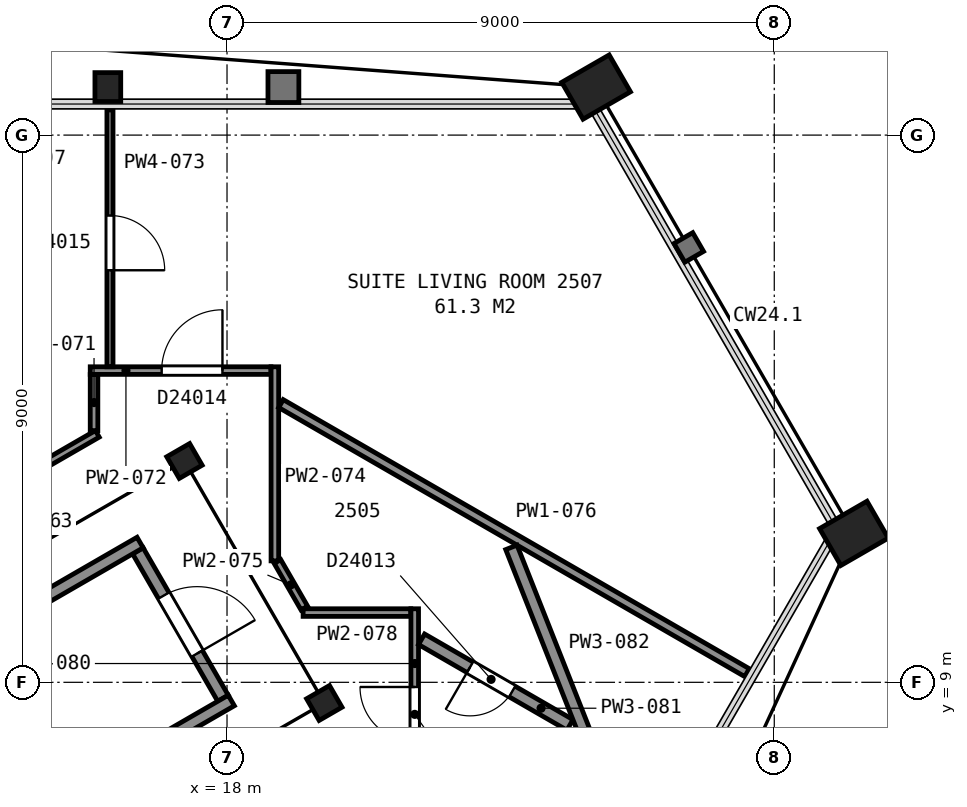
"""IFC4 building model, lengths in metres.
Left out: names, types, materials, properties, quantities, classifications, styles, units other than length and angle.
Written with IfcOpenShell. Run it as: python <this file> out.ifc"""

import sys

from ifc_helpers import new_model, si_unit, direction, frame, frame_2d, origin, origin_2d, place, context, subcontext, project, spatial, rectangle, hollow_rectangle, i_section, extrude, element, fill, save


model = new_model("IFC4")
c1 = context("Model", 3, precision=1e-05, world=origin(), true_north=direction((0.0, 1.0)))
c2 = subcontext(c1, "Body", "Model", "MODEL_VIEW")
j1 = project(units=[si_unit("LENGTHUNIT", "METRE"), si_unit("PLANEANGLEUNIT", "RADIAN")], contexts=[c1])
p1 = place(None, origin())
s1 = spatial("IfcSite", under=j1, at=p1, CompositionType="ELEMENT")
p2 = place(p1, origin())
s2 = spatial("IfcBuilding", under=s1, at=p2, CompositionType="ELEMENT")
p3 = place(p2, frame((0.0, 0.0, 107.2)))
s3 = spatial("IfcBuildingStorey", under=s2, at=p3, CompositionType="ELEMENT", Elevation=107.2)
p4 = place(p3, frame((24.07, 18.79, 0.0), z_axis=(0.0, 0.0, 1.0), x_axis=(0.5, -0.866025403784, 0.0)))
e1 = element("IfcColumn", 1, at=p4, inside=s3, PredefinedType="COLUMN", context=c2, shape_type="SweptSolid", body=[
    extrude(hollow_rectangle(XDim=0.7, YDim=0.9, WallThickness=0.065, at=origin_2d()), origin(), (0.0, 0.0, 1.0), 3.6),
])
p5 = place(p3, frame((16.04, 18.79, 0.0), z_axis=(0.0, 0.0, 1.0), x_axis=(1.0, 0.0, 0.0)))
e2 = element("IfcColumn", 2, at=p5, inside=s3, PredefinedType="COLUMN", context=c2, shape_type="SweptSolid", body=[
    extrude(i_section(OverallWidth=0.424, OverallDepth=0.475, WebThickness=0.048, FlangeThickness=0.077, FilletRadius=0.015, at=origin_2d()), origin(), (0.0, 0.0, 1.0), 3.6),
])
p6 = place(p3, frame((28.31, 11.45, 0.0), z_axis=(0.0, 0.0, 1.0), x_axis=(0.5, -0.866025403784, 0.0)))
e3 = element("IfcColumn", 3, at=p6, inside=s3, PredefinedType="COLUMN", context=c2, shape_type="SweptSolid", body=[
    extrude(hollow_rectangle(XDim=0.7, YDim=0.9, WallThickness=0.065, at=origin_2d()), origin(), (0.0, 0.0, 1.0), 3.6),
])
for number, where, z_axis, x_axis in (
    (4, (19.6, 8.66, 0.0), (0.0, 0.0, 1.0), (0.5, -0.866, 0.0)),
    (5, (17.3, 12.64, 0.0), (0.0, 0.0, 1.0), (0.5, -0.866, 0.0)),
):
    element("IfcColumn", number, at=place(p3, frame(where, z_axis=z_axis, x_axis=x_axis)), inside=s3, PredefinedType="COLUMN", context=c2, shape_type="SweptSolid", body=[
        extrude(i_section(OverallWidth=0.411, OverallDepth=0.434, WebThickness=0.036, FlangeThickness=0.057, FilletRadius=0.015, at=origin_2d()), origin(), (0.0, 0.0, 1.0), 3.6),
    ])
p7 = place(p3, frame((17.934, 8.738, 0.0), z_axis=(0.0, 0.0, 1.0), x_axis=(-0.49998411664, 0.866034573852, 0.0)))
e6 = element("IfcWall", 6, at=p7, inside=s3, PredefinedType="PARTITIONING", context=c2, shape_type="SweptSolid", body=[
    extrude(rectangle(XDim=2.8, YDim=0.2, at=frame_2d((1.4, 0.0))), origin(), (0.0, 0.0, 1.0), 3.35),
])
p8 = place(p7, frame((0.85, 0.0, 0.0)))
e7 = element("IfcOpeningElement", 7, at=p8, cuts=e6, PredefinedType="OPENING", context=c2, shape_type="SweptSolid", body=[
    extrude(rectangle(XDim=1.1, YDim=2.1, at=frame_2d((0.55, 1.05))), frame((0.0, 0.11, 0.0), z_axis=(0.0, -1.0, 0.0), x_axis=(1.0, 0.0, 0.0)), (0.0, 0.0, 1.0), 0.22),
])
for number, where, z_axis, x_axis in (
    (8, (6.178, 5.299, 0.0), (0.0, 0.0, 1.0), (0.866, 0.5, 0.0)),
    (9, (7.678, 2.701, 0.0), (0.0, 0.0, 1.0), (0.866, 0.5, 0.0)),
):
    element("IfcWall", number, at=place(p3, frame(where, z_axis=z_axis, x_axis=x_axis)), inside=s3, PredefinedType="PARTITIONING", context=c2, shape_type="SweptSolid", body=[
        extrude(rectangle(XDim=12.0, YDim=0.2, at=frame_2d((6.0, 0.0))), origin(), (0.0, 0.0, 1.0), 3.35),
    ])
p9 = place(p3, frame((12.327, 11.042, 0.0), z_axis=(0.0, 0.0, 1.0), x_axis=(0.866070231021, 0.499922348909, 0.0)))
e10 = element("IfcWall", 10, at=p9, inside=s3, PredefinedType="PARTITIONING", context=c2, shape_type="SweptSolid", body=[
    extrude(rectangle(XDim=4.088, YDim=0.125, at=frame_2d((2.044, 0.0))), origin(), (0.0, 0.0, 1.0), 2.613),
])
p10 = place(p3, frame((15.813, 13.14, 0.0), z_axis=(0.0, 0.0, 1.0), x_axis=(0.0, 1.0, 0.0)))
e11 = element("IfcWall", 11, at=p10, inside=s3, PredefinedType="PARTITIONING", context=c2, shape_type="SweptSolid", body=[
    extrude(rectangle(XDim=0.922, YDim=0.125, at=frame_2d((0.461, 0.0))), origin(), (0.0, 0.0, 1.0), 2.613),
])
p11 = place(p3, frame((15.75, 14.127, 0.0), z_axis=(0.0, 0.0, 1.0), x_axis=(1.0, 0.0, 0.0)))
e12 = element("IfcWall", 12, at=p11, inside=s3, PredefinedType="PARTITIONING", context=c2, shape_type="SweptSolid", body=[
    extrude(rectangle(XDim=2.971, YDim=0.125, at=frame_2d((1.486, 0.0))), origin(), (0.0, 0.0, 1.0), 2.613),
])
p12 = place(p11, frame((1.175, 0.0, 0.0)))
e13 = element("IfcOpeningElement", 13, at=p12, cuts=e12, PredefinedType="OPENING", context=c2, shape_type="SweptSolid", body=[
    extrude(rectangle(XDim=1.0, YDim=2.1, at=frame_2d((0.5, 1.05))), frame((0.0, 0.073, 0.0), z_axis=(0.0, -1.0, 0.0), x_axis=(1.0, 0.0, 0.0)), (0.0, 0.0, 1.0), 0.145),
])
p13 = place(p3, frame((16.075, 14.189, 0.0), z_axis=(0.0, 0.0, 1.0), x_axis=(0.0, 1.0, 0.0)))
e14 = element("IfcWall", 14, at=p13, inside=s3, PredefinedType="PARTITIONING", context=c2, shape_type="SweptSolid", body=[
    extrude(rectangle(XDim=4.226, YDim=0.1, at=frame_2d((2.113, 0.0))), origin(), (0.0, 0.0, 1.0), 2.613),
])
p14 = place(p13, frame((1.587, 0.0, 0.0)))
e15 = element("IfcOpeningElement", 15, at=p14, cuts=e14, PredefinedType="OPENING", context=c2, shape_type="SweptSolid", body=[
    extrude(rectangle(XDim=0.9, YDim=2.1, at=frame_2d((0.45, 1.05))), frame((0.0, 0.06, 0.0), z_axis=(0.0, -1.0, 0.0), x_axis=(1.0, 0.0, 0.0)), (0.0, 0.0, 1.0), 0.12),
])
p15 = place(p3, frame((18.787, 10.998, 0.0), z_axis=(0.0, 0.0, 1.0), x_axis=(0.0, 1.0, 0.0)))
e16 = element("IfcWall", 16, at=p15, inside=s3, PredefinedType="PARTITIONING", context=c2, shape_type="SweptSolid", body=[
    extrude(rectangle(XDim=3.192, YDim=0.125, at=frame_2d((1.596, 0.0))), origin(), (0.0, 0.0, 1.0), 2.613),
])
p16 = place(p3, frame((18.83, 10.986, 0.0), z_axis=(0.0, 0.0, 1.0), x_axis=(0.499881837328, -0.866093614288, 0.0)))
e17 = element("IfcWall", 17, at=p16, inside=s3, PredefinedType="PARTITIONING", context=c2, shape_type="SweptSolid", body=[
    extrude(rectangle(XDim=0.884, YDim=0.125, at=frame_2d((0.442, 0.0))), origin(), (0.0, 0.0, 1.0), 2.613),
])
p17 = place(p3, frame((18.887, 13.584, 0.0), z_axis=(0.0, 0.0, 1.0), x_axis=(0.866024349092, -0.500001826776, 0.0)))
e18 = element("IfcWall", 18, at=p17, inside=s3, PredefinedType="PARTITIONING", context=c2, shape_type="SweptSolid", body=[
    extrude(rectangle(XDim=8.851, YDim=0.15, at=frame_2d((4.425, 0.0))), origin(), (0.0, 0.0, 1.0), 2.613),
])
p18 = place(p3, frame((19.251, 10.147, 0.0), z_axis=(0.0, 0.0, 1.0), x_axis=(1.0, 0.0, 0.0)))
e19 = element("IfcWall", 19, at=p18, inside=s3, PredefinedType="PARTITIONING", context=c2, shape_type="SweptSolid", body=[
    extrude(rectangle(XDim=1.771, YDim=0.125, at=frame_2d((0.885, 0.0))), origin(), (0.0, 0.0, 1.0), 2.613),
])
p19 = place(p3, frame((21.087, 10.209, 0.0), z_axis=(0.0, 0.0, 1.0), x_axis=(0.0, -1.0, 0.0)))
e20 = element("IfcWall", 20, at=p19, inside=s3, PredefinedType="PARTITIONING", context=c2, shape_type="SweptSolid", body=[
    extrude(rectangle(XDim=3.099, YDim=0.125, at=frame_2d((1.549, 0.0))), origin(), (0.0, 0.0, 1.0), 2.613),
])
p20 = place(p19, frame((1.287, 0.0, 0.0)))
e21 = element("IfcOpeningElement", 21, at=p20, cuts=e20, PredefinedType="OPENING", context=c2, shape_type="SweptSolid", body=[
    extrude(rectangle(XDim=0.9, YDim=2.1, at=frame_2d((0.45, 1.05))), frame((0.0, 0.073, 0.0), z_axis=(0.0, -1.0, 0.0), x_axis=(1.0, 0.0, 0.0)), (0.0, 0.0, 1.0), 0.145),
])
p21 = place(p3, frame((21.199, 9.708, 0.0), z_axis=(0.0, 0.0, 1.0), x_axis=(0.866129327763, -0.499819955173, 0.0)))
e22 = element("IfcWall", 22, at=p21, inside=s3, PredefinedType="PARTITIONING", context=c2, shape_type="SweptSolid", body=[
    extrude(rectangle(XDim=2.818, YDim=0.2, at=frame_2d((1.409, 0.0))), origin(), (0.0, 0.0, 1.0), 2.613),
])
p22 = place(p21, frame((0.92, 0.0, 0.0)))
e23 = element("IfcOpeningElement", 23, at=p22, cuts=e22, PredefinedType="OPENING", context=c2, shape_type="SweptSolid", body=[
    extrude(rectangle(XDim=0.8, YDim=2.1, at=frame_2d((0.4, 1.05))), frame((0.0, 0.11, 0.0), z_axis=(0.0, -1.0, 0.0), x_axis=(1.0, 0.0, 0.0)), (0.0, 0.0, 1.0), 0.22),
])
p23 = place(p3, frame((22.677, 11.22, 0.0), z_axis=(0.0, 0.0, 1.0), x_axis=(0.36751707294, -0.930016774632, 0.0)))
e24 = element("IfcWall", 24, at=p23, inside=s3, PredefinedType="PARTITIONING", context=c2, shape_type="SweptSolid", body=[
    extrude(rectangle(XDim=3.393, YDim=0.2, at=frame_2d((1.697, 0.0))), origin(), (0.0, 0.0, 1.0), 2.613),
])
p24 = place(p8, origin())
e25 = element("IfcDoor", 25, at=p24, inside=s3, OperationType="SINGLE_SWING_LEFT", PredefinedType="DOOR", context=c2, shape_type="SweptSolid", body=[
    extrude(rectangle(XDim=1.1, YDim=2.1, at=frame_2d((0.55, 1.05))), frame((0.0, 0.025, 0.0), z_axis=(0.0, -1.0, 0.0), x_axis=(1.0, 0.0, 0.0)), (0.0, 0.0, 1.0), 0.05),
])
fill(e7, e25)
p25 = place(p12, origin())
e26 = element("IfcDoor", 26, at=p25, inside=s3, OperationType="SINGLE_SWING_RIGHT", PredefinedType="DOOR", context=c2, shape_type="SweptSolid", body=[
    extrude(rectangle(XDim=1.0, YDim=2.1, at=frame_2d((0.5, 1.05))), frame((0.0, 0.025, 0.0), z_axis=(0.0, -1.0, 0.0), x_axis=(1.0, 0.0, 0.0)), (0.0, 0.0, 1.0), 0.05),
])
fill(e13, e26)
p26 = place(p14, origin())
e27 = element("IfcDoor", 27, at=p26, inside=s3, OperationType="SINGLE_SWING_LEFT", PredefinedType="DOOR", context=c2, shape_type="SweptSolid", body=[
    extrude(rectangle(XDim=0.9, YDim=2.1, at=frame_2d((0.45, 1.05))), frame((0.0, 0.025, 0.0), z_axis=(0.0, -1.0, 0.0), x_axis=(1.0, 0.0, 0.0)), (0.0, 0.0, 1.0), 0.05),
])
fill(e15, e27)
p27 = place(p20, origin())
e28 = element("IfcDoor", 28, at=p27, inside=s3, OperationType="SINGLE_SWING_LEFT", PredefinedType="DOOR", context=c2, shape_type="SweptSolid", body=[
    extrude(rectangle(XDim=0.9, YDim=2.1, at=frame_2d((0.45, 1.05))), frame((0.0, 0.025, 0.0), z_axis=(0.0, -1.0, 0.0), x_axis=(1.0, 0.0, 0.0)), (0.0, 0.0, 1.0), 0.05),
])
fill(e21, e28)
p28 = place(p22, origin())
e29 = element("IfcDoor", 29, at=p28, inside=s3, OperationType="SINGLE_SWING_LEFT", PredefinedType="DOOR", context=c2, shape_type="SweptSolid", body=[
    extrude(rectangle(XDim=0.8, YDim=2.1, at=frame_2d((0.4, 1.05))), frame((0.0, 0.025, 0.0), z_axis=(0.0, -1.0, 0.0), x_axis=(1.0, 0.0, 0.0)), (0.0, 0.0, 1.0), 0.05),
])
fill(e23, e29)
save(model, sys.argv[1])
